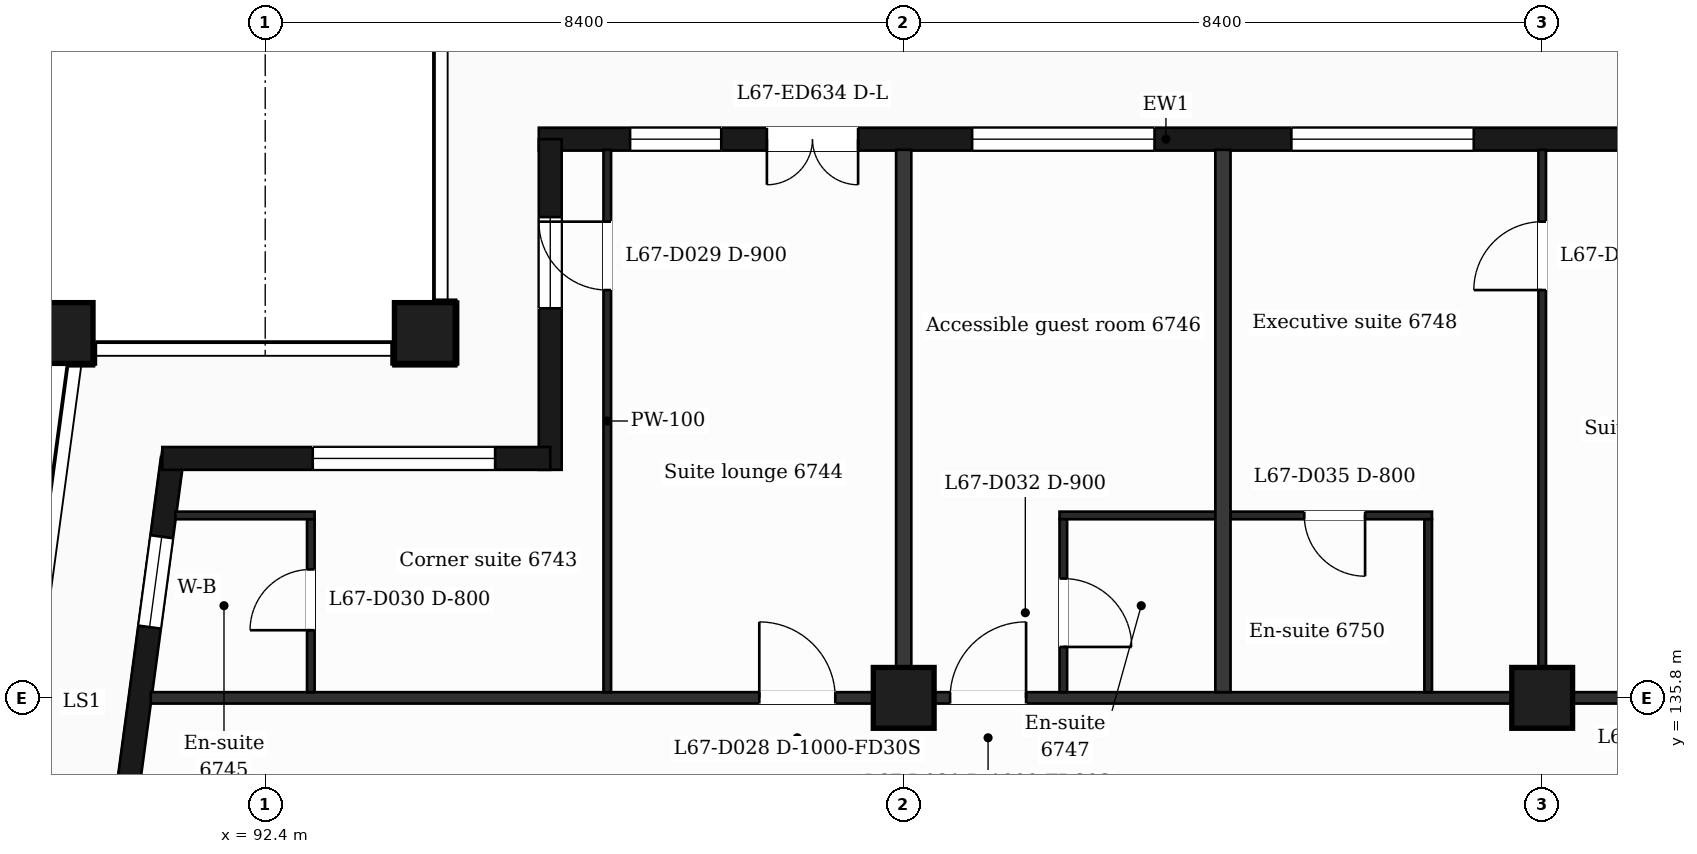
"""IFC4 building model, lengths in metres.
Left out: names, types, materials, properties, quantities, classifications, styles, units other than length and angle.
Written with IfcOpenShell. Run it as: python <this file> out.ifc"""

import sys

from ifc_helpers import new_model, si_unit, direction, frame, frame_2d, origin, origin_2d, place, context, subcontext, project, spatial, rectangle, extrude, element, fill, save


model = new_model("IFC4")
c1 = context("Model", 3, precision=1e-05, world=origin(), true_north=direction((0.0, 1.0)))
c2 = subcontext(c1, "Body", "Model", "MODEL_VIEW")
j1 = project(units=[si_unit("LENGTHUNIT", "METRE"), si_unit("PLANEANGLEUNIT", "RADIAN")], contexts=[c1])
p1 = place(None, origin())
s1 = spatial("IfcSite", under=j1, at=p1, CompositionType="ELEMENT")
p2 = place(p1, origin())
s2 = spatial("IfcBuilding", under=s1, at=p2, CompositionType="ELEMENT")
p3 = place(p2, frame((0.0, 0.0, 277.5)))
s3 = spatial("IfcBuildingStorey", under=s2, at=p3, CompositionType="ELEMENT", Elevation=277.5)
for number, where, z_axis, x_axis in (
    (1, (94.5, 140.6, 0.0), (0.0, 0.0, 1.0), (1.0, 0.0, 0.0)),
    (2, (89.735, 140.6, 0.0), (0.0, 0.0, 1.0), (1.0, 0.0, 0.0)),
    (3, (100.8, 135.8, 0.0), (0.0, 0.0, 1.0), (1.0, 0.0, 0.0)),
    (4, (109.2, 135.8, 0.0), (0.0, 0.0, 1.0), (1.0, 0.0, 0.0)),
):
    element("IfcColumn", number, at=place(p3, frame(where, z_axis=z_axis, x_axis=x_axis)), inside=s3, PredefinedType="COLUMN", context=c2, shape_type="SweptSolid", body=[
        extrude(rectangle(XDim=0.8, YDim=0.8, at=origin_2d()), origin(), (0.0, 0.0, 1.0), 3.7),
    ])
p4 = place(p3, frame((91.177, 138.95, 0.0), z_axis=(0.0, 0.0, 1.0), x_axis=(-0.133426664613, -0.991058689065, 0.0)))
e5 = element("IfcWall", 5, at=p4, inside=s3, PredefinedType="SOLIDWALL", context=c2, shape_type="SweptSolid", body=[
    extrude(rectangle(XDim=6.609, YDim=0.3, at=frame_2d((3.305, 0.0))), origin(), (0.0, 0.0, 1.0), 3.38),
])
p5 = place(p4, frame((1.039, 0.0, 0.9)))
e6 = element("IfcOpeningElement", 6, at=p5, cuts=e5, PredefinedType="OPENING", context=c2, shape_type="SweptSolid", body=[
    extrude(rectangle(XDim=1.2, YDim=2.1, at=frame_2d((0.6, 1.05))), frame((0.0, 0.16, 0.0), z_axis=(0.0, -1.0, 0.0), x_axis=(1.0, 0.0, 0.0)), (0.0, 0.0, 1.0), 0.32),
])
p6 = place(p4, frame((4.294, 0.0, 0.0)))
e7 = element("IfcOpeningElement", 7, at=p6, cuts=e5, PredefinedType="OPENING", context=c2, shape_type="SweptSolid", body=[
    extrude(rectangle(XDim=1.2, YDim=2.4, at=frame_2d((0.6, 1.2))), frame((0.0, 0.16, 0.0), z_axis=(0.0, -1.0, 0.0), x_axis=(1.0, 0.0, 0.0)), (0.0, 0.0, 1.0), 0.32),
])
p7 = place(p3, frame((112.5, 143.15, 0.0), z_axis=(0.0, 0.0, 1.0), x_axis=(-1.0, 0.0, 0.0)))
e8 = element("IfcWall", 8, at=p7, inside=s3, PredefinedType="SOLIDWALL", context=c2, shape_type="SweptSolid", body=[
    extrude(rectangle(XDim=16.5, YDim=0.3, at=frame_2d((8.25, 0.0))), origin(), (0.0, 0.0, 1.0), 3.38),
])
p8 = place(p7, frame((1.1, 0.0, 0.9)))
e9 = element("IfcOpeningElement", 9, at=p8, cuts=e8, PredefinedType="OPENING", context=c2, shape_type="SweptSolid", body=[
    extrude(rectangle(XDim=1.2, YDim=2.1, at=frame_2d((0.6, 1.05))), frame((0.0, 0.16, 0.0), z_axis=(0.0, -1.0, 0.0), x_axis=(1.0, 0.0, 0.0)), (0.0, 0.0, 1.0), 0.32),
])
p9 = place(p7, frame((4.2, 0.0, 0.9)))
e10 = element("IfcOpeningElement", 10, at=p9, cuts=e8, PredefinedType="OPENING", context=c2, shape_type="SweptSolid", body=[
    extrude(rectangle(XDim=2.4, YDim=2.1, at=frame_2d((1.2, 1.05))), frame((0.0, 0.16, 0.0), z_axis=(0.0, -1.0, 0.0), x_axis=(1.0, 0.0, 0.0)), (0.0, 0.0, 1.0), 0.32),
])
p10 = place(p7, frame((8.4, 0.0, 0.9)))
e11 = element("IfcOpeningElement", 11, at=p10, cuts=e8, PredefinedType="OPENING", context=c2, shape_type="SweptSolid", body=[
    extrude(rectangle(XDim=2.4, YDim=2.1, at=frame_2d((1.2, 1.05))), frame((0.0, 0.16, 0.0), z_axis=(0.0, -1.0, 0.0), x_axis=(1.0, 0.0, 0.0)), (0.0, 0.0, 1.0), 0.32),
])
p11 = place(p7, frame((12.3, 0.0, 0.0)))
e12 = element("IfcOpeningElement", 12, at=p11, cuts=e8, PredefinedType="OPENING", context=c2, shape_type="SweptSolid", body=[
    extrude(rectangle(XDim=1.2, YDim=2.4, at=frame_2d((0.6, 1.2))), frame((0.0, 0.16, 0.0), z_axis=(0.0, -1.0, 0.0), x_axis=(1.0, 0.0, 0.0)), (0.0, 0.0, 1.0), 0.32),
])
p12 = place(p7, frame((14.1, 0.0, 0.9)))
e13 = element("IfcOpeningElement", 13, at=p12, cuts=e8, PredefinedType="OPENING", context=c2, shape_type="SweptSolid", body=[
    extrude(rectangle(XDim=1.2, YDim=2.1, at=frame_2d((0.6, 1.05))), frame((0.0, 0.16, 0.0), z_axis=(0.0, -1.0, 0.0), x_axis=(1.0, 0.0, 0.0)), (0.0, 0.0, 1.0), 0.32),
])
p13 = place(p3, frame((96.15, 143.15, 0.0), z_axis=(0.0, 0.0, 1.0), x_axis=(0.0, -1.0, 0.0)))
e14 = element("IfcWall", 14, at=p13, inside=s3, PredefinedType="SOLIDWALL", context=c2, shape_type="SweptSolid", body=[
    extrude(rectangle(XDim=4.35, YDim=0.3, at=frame_2d((2.175, 0.0))), origin(), (0.0, 0.0, 1.0), 3.38),
])
p14 = place(p13, frame((1.025, 0.0, 0.9)))
e15 = element("IfcOpeningElement", 15, at=p14, cuts=e14, PredefinedType="OPENING", context=c2, shape_type="SweptSolid", body=[
    extrude(rectangle(XDim=1.2, YDim=2.1, at=frame_2d((0.6, 1.05))), frame((0.0, 0.16, 0.0), z_axis=(0.0, -1.0, 0.0), x_axis=(1.0, 0.0, 0.0)), (0.0, 0.0, 1.0), 0.32),
])
p15 = place(p3, frame((96.15, 138.95, 0.0), z_axis=(0.0, 0.0, 1.0), x_axis=(-1.0, 0.0, 0.0)))
e16 = element("IfcWall", 16, at=p15, inside=s3, PredefinedType="SOLIDWALL", context=c2, shape_type="SweptSolid", body=[
    extrude(rectangle(XDim=5.104, YDim=0.3, at=frame_2d((2.552, 0.0))), origin(), (0.0, 0.0, 1.0), 3.38),
])
p16 = place(p15, frame((0.725, 0.0, 0.9)))
e17 = element("IfcOpeningElement", 17, at=p16, cuts=e16, PredefinedType="OPENING", context=c2, shape_type="SweptSolid", body=[
    extrude(rectangle(XDim=2.4, YDim=2.1, at=frame_2d((1.2, 1.05))), frame((0.0, 0.16, 0.0), z_axis=(0.0, -1.0, 0.0), x_axis=(1.0, 0.0, 0.0)), (0.0, 0.0, 1.0), 0.32),
])
p17 = place(p3, frame((90.895, 135.8, 0.0), z_axis=(0.0, 0.0, 1.0), x_axis=(1.0, 0.0, 0.0)))
e18 = element("IfcWall", 18, at=p17, inside=s3, PredefinedType="PARTITIONING", context=c2, shape_type="SweptSolid", body=[
    extrude(rectangle(XDim=45.011, YDim=0.15, at=frame_2d((22.505, 0.0))), origin(), (0.0, 0.0, 1.0), 3.38),
])
p18 = place(p17, frame((8.005, 0.0, 0.0)))
e19 = element("IfcOpeningElement", 19, at=p18, cuts=e18, PredefinedType="OPENING", context=c2, shape_type="SweptSolid", body=[
    extrude(rectangle(XDim=1.0, YDim=2.1, at=frame_2d((0.5, 1.05))), frame((0.0, 0.085, 0.0), z_axis=(0.0, -1.0, 0.0), x_axis=(1.0, 0.0, 0.0)), (0.0, 0.0, 1.0), 0.17),
])
p19 = place(p17, frame((10.515, 0.0, 0.0)))
e20 = element("IfcOpeningElement", 20, at=p19, cuts=e18, PredefinedType="OPENING", context=c2, shape_type="SweptSolid", body=[
    extrude(rectangle(XDim=1.0, YDim=2.1, at=frame_2d((0.5, 1.05))), frame((0.0, 0.085, 0.0), z_axis=(0.0, -1.0, 0.0), x_axis=(1.0, 0.0, 0.0)), (0.0, 0.0, 1.0), 0.17),
])
p20 = place(p17, frame((20.156, 0.0, 0.0)))
e21 = element("IfcOpeningElement", 21, at=p20, cuts=e18, PredefinedType="OPENING", context=c2, shape_type="SweptSolid", body=[
    extrude(rectangle(XDim=1.0, YDim=2.1, at=frame_2d((0.5, 1.05))), frame((0.0, 0.085, 0.0), z_axis=(0.0, -1.0, 0.0), x_axis=(1.0, 0.0, 0.0)), (0.0, 0.0, 1.0), 0.17),
])
p21 = place(p17, frame((24.13, 0.0, 0.0)))
e22 = element("IfcOpeningElement", 22, at=p21, cuts=e18, PredefinedType="OPENING", context=c2, shape_type="SweptSolid", body=[
    extrude(rectangle(XDim=0.95, YDim=2.1, at=frame_2d((0.475, 1.05))), frame((0.0, 0.085, 0.0), z_axis=(0.0, -1.0, 0.0), x_axis=(1.0, 0.0, 0.0)), (0.0, 0.0, 1.0), 0.17),
])
p22 = place(p17, frame((29.492, 0.0, 0.0)))
e23 = element("IfcOpeningElement", 23, at=p22, cuts=e18, PredefinedType="OPENING", context=c2, shape_type="SweptSolid", body=[
    extrude(rectangle(XDim=0.95, YDim=2.1, at=frame_2d((0.475, 1.05))), frame((0.0, 0.085, 0.0), z_axis=(0.0, -1.0, 0.0), x_axis=(1.0, 0.0, 0.0)), (0.0, 0.0, 1.0), 0.17),
])
p23 = place(p17, frame((31.705, 0.0, 0.0)))
e24 = element("IfcOpeningElement", 24, at=p23, cuts=e18, PredefinedType="OPENING", context=c2, shape_type="SweptSolid", body=[
    extrude(rectangle(XDim=0.95, YDim=2.1, at=frame_2d((0.475, 1.05))), frame((0.0, 0.085, 0.0), z_axis=(0.0, -1.0, 0.0), x_axis=(1.0, 0.0, 0.0)), (0.0, 0.0, 1.0), 0.17),
])
p24 = place(p17, frame((39.814, 0.0, 0.0)))
e25 = element("IfcOpeningElement", 25, at=p24, cuts=e18, PredefinedType="OPENING", context=c2, shape_type="SweptSolid", body=[
    extrude(rectangle(XDim=0.95, YDim=2.1, at=frame_2d((0.475, 1.05))), frame((0.0, 0.085, 0.0), z_axis=(0.0, -1.0, 0.0), x_axis=(1.0, 0.0, 0.0)), (0.0, 0.0, 1.0), 0.17),
])
p25 = place(p3, frame((91.218, 138.2, 0.0), z_axis=(0.0, 0.0, 1.0), x_axis=(1.0, 0.0, 0.0)))
e26 = element("IfcWall", 26, at=p25, inside=s3, PredefinedType="PARTITIONING", context=c2, shape_type="SweptSolid", body=[
    extrude(rectangle(XDim=1.832, YDim=0.1, at=frame_2d((0.916, 0.0))), origin(), (0.0, 0.0, 1.0), 3.38),
])
p26 = place(p3, frame((102.85, 138.2, 0.0), z_axis=(0.0, 0.0, 1.0), x_axis=(1.0, 0.0, 0.0)))
e27 = element("IfcWall", 27, at=p26, inside=s3, PredefinedType="PARTITIONING", context=c2, shape_type="SweptSolid", body=[
    extrude(rectangle(XDim=4.9, YDim=0.1, at=frame_2d((2.45, 0.0))), origin(), (0.0, 0.0, 1.0), 3.38),
])
p27 = place(p26, frame((3.22, 0.0, 0.0)))
e28 = element("IfcOpeningElement", 28, at=p27, cuts=e27, PredefinedType="OPENING", context=c2, shape_type="SweptSolid", body=[
    extrude(rectangle(XDim=0.8, YDim=2.1, at=frame_2d((0.4, 1.05))), frame((0.0, 0.06, 0.0), z_axis=(0.0, -1.0, 0.0), x_axis=(1.0, 0.0, 0.0)), (0.0, 0.0, 1.0), 0.12),
])
p28 = place(p3, frame((93.0, 135.875, 0.0), z_axis=(0.0, 0.0, 1.0), x_axis=(0.0, 1.0, 0.0)))
e29 = element("IfcWall", 29, at=p28, inside=s3, PredefinedType="PARTITIONING", context=c2, shape_type="SweptSolid", body=[
    extrude(rectangle(XDim=2.275, YDim=0.1, at=frame_2d((1.137, 0.0))), origin(), (0.0, 0.0, 1.0), 3.38),
])
p29 = place(p28, frame((0.815, 0.0, 0.0)))
e30 = element("IfcOpeningElement", 30, at=p29, cuts=e29, PredefinedType="OPENING", context=c2, shape_type="SweptSolid", body=[
    extrude(rectangle(XDim=0.8, YDim=2.1, at=frame_2d((0.4, 1.05))), frame((0.0, 0.06, 0.0), z_axis=(0.0, -1.0, 0.0), x_axis=(1.0, 0.0, 0.0)), (0.0, 0.0, 1.0), 0.12),
])
p30 = place(p3, frame((96.9, 135.875, 0.0), z_axis=(0.0, 0.0, 1.0), x_axis=(0.0, 1.0, 0.0)))
e31 = element("IfcWall", 31, at=p30, inside=s3, PredefinedType="PARTITIONING", context=c2, shape_type="SweptSolid", body=[
    extrude(rectangle(XDim=7.135, YDim=0.1, at=frame_2d((3.567, 0.0))), origin(), (0.0, 0.0, 1.0), 3.38),
])
p31 = place(p30, frame((5.29, 0.0, 0.0)))
e32 = element("IfcOpeningElement", 32, at=p31, cuts=e31, PredefinedType="OPENING", context=c2, shape_type="SweptSolid", body=[
    extrude(rectangle(XDim=0.9, YDim=2.1, at=frame_2d((0.45, 1.05))), frame((0.0, 0.06, 0.0), z_axis=(0.0, -1.0, 0.0), x_axis=(1.0, 0.0, 0.0)), (0.0, 0.0, 1.0), 0.12),
])
p32 = place(p3, frame((100.8, 135.875, 0.0), z_axis=(0.0, 0.0, 1.0), x_axis=(0.0, 1.0, 0.0)))
e33 = element("IfcWall", 33, at=p32, inside=s3, PredefinedType="PARTITIONING", context=c2, shape_type="SweptSolid", body=[
    extrude(rectangle(XDim=7.135, YDim=0.2, at=frame_2d((3.567, 0.0))), origin(), (0.0, 0.0, 1.0), 3.38),
])
p33 = place(p3, frame((102.9, 135.875, 0.0), z_axis=(0.0, 0.0, 1.0), x_axis=(0.0, 1.0, 0.0)))
e34 = element("IfcWall", 34, at=p33, inside=s3, PredefinedType="PARTITIONING", context=c2, shape_type="SweptSolid", body=[
    extrude(rectangle(XDim=2.275, YDim=0.1, at=frame_2d((1.137, 0.0))), origin(), (0.0, 0.0, 1.0), 3.38),
])
p34 = place(p33, frame((0.595, 0.0, 0.0)))
e35 = element("IfcOpeningElement", 35, at=p34, cuts=e34, PredefinedType="OPENING", context=c2, shape_type="SweptSolid", body=[
    extrude(rectangle(XDim=0.9, YDim=2.1, at=frame_2d((0.45, 1.05))), frame((0.0, 0.06, 0.0), z_axis=(0.0, -1.0, 0.0), x_axis=(1.0, 0.0, 0.0)), (0.0, 0.0, 1.0), 0.12),
])
p35 = place(p3, frame((105.0, 135.875, 0.0), z_axis=(0.0, 0.0, 1.0), x_axis=(0.0, 1.0, 0.0)))
e36 = element("IfcWall", 36, at=p35, inside=s3, PredefinedType="PARTITIONING", context=c2, shape_type="SweptSolid", body=[
    extrude(rectangle(XDim=7.135, YDim=0.2, at=frame_2d((3.567, 0.0))), origin(), (0.0, 0.0, 1.0), 3.38),
])
p36 = place(p3, frame((107.7, 135.875, 0.0), z_axis=(0.0, 0.0, 1.0), x_axis=(0.0, 1.0, 0.0)))
e37 = element("IfcWall", 37, at=p36, inside=s3, PredefinedType="PARTITIONING", context=c2, shape_type="SweptSolid", body=[
    extrude(rectangle(XDim=2.275, YDim=0.1, at=frame_2d((1.137, 0.0))), origin(), (0.0, 0.0, 1.0), 3.38),
])
p37 = place(p3, frame((109.2, 135.875, 0.0), z_axis=(0.0, 0.0, 1.0), x_axis=(0.0, 1.0, 0.0)))
e38 = element("IfcWall", 38, at=p37, inside=s3, PredefinedType="PARTITIONING", context=c2, shape_type="SweptSolid", body=[
    extrude(rectangle(XDim=7.135, YDim=0.1, at=frame_2d((3.567, 0.0))), origin(), (0.0, 0.0, 1.0), 3.38),
])
p38 = place(p37, frame((5.29, 0.0, 0.0)))
e39 = element("IfcOpeningElement", 39, at=p38, cuts=e38, PredefinedType="OPENING", context=c2, shape_type="SweptSolid", body=[
    extrude(rectangle(XDim=0.9, YDim=2.1, at=frame_2d((0.45, 1.05))), frame((0.0, 0.06, 0.0), z_axis=(0.0, -1.0, 0.0), x_axis=(1.0, 0.0, 0.0)), (0.0, 0.0, 1.0), 0.12),
])
p39 = place(p5, origin())
e40 = element("IfcWindow", 40, at=p39, inside=s3, PartitioningType="SINGLE_PANEL", PredefinedType="WINDOW", context=c2, shape_type="SweptSolid", body=[
    extrude(rectangle(XDim=1.2, YDim=2.1, at=frame_2d((0.6, 1.05))), frame((0.0, 0.03, 0.0), z_axis=(0.0, -1.0, 0.0), x_axis=(1.0, 0.0, 0.0)), (0.0, 0.0, 1.0), 0.06),
])
fill(e6, e40)
p40 = place(p8, origin())
e41 = element("IfcWindow", 41, at=p40, inside=s3, PartitioningType="SINGLE_PANEL", PredefinedType="WINDOW", context=c2, shape_type="SweptSolid", body=[
    extrude(rectangle(XDim=1.2, YDim=2.1, at=frame_2d((0.6, 1.05))), frame((0.0, 0.03, 0.0), z_axis=(0.0, -1.0, 0.0), x_axis=(1.0, 0.0, 0.0)), (0.0, 0.0, 1.0), 0.06),
])
fill(e9, e41)
p41 = place(p9, origin())
e42 = element("IfcWindow", 42, at=p41, inside=s3, PartitioningType="SINGLE_PANEL", PredefinedType="WINDOW", context=c2, shape_type="SweptSolid", body=[
    extrude(rectangle(XDim=2.4, YDim=2.1, at=frame_2d((1.2, 1.05))), frame((0.0, 0.03, 0.0), z_axis=(0.0, -1.0, 0.0), x_axis=(1.0, 0.0, 0.0)), (0.0, 0.0, 1.0), 0.06),
])
fill(e10, e42)
p42 = place(p10, origin())
e43 = element("IfcWindow", 43, at=p42, inside=s3, PartitioningType="SINGLE_PANEL", PredefinedType="WINDOW", context=c2, shape_type="SweptSolid", body=[
    extrude(rectangle(XDim=2.4, YDim=2.1, at=frame_2d((1.2, 1.05))), frame((0.0, 0.03, 0.0), z_axis=(0.0, -1.0, 0.0), x_axis=(1.0, 0.0, 0.0)), (0.0, 0.0, 1.0), 0.06),
])
fill(e11, e43)
p43 = place(p11, origin())
e44 = element("IfcDoor", 44, at=p43, inside=s3, OperationType="DOUBLE_DOOR_SINGLE_SWING", PredefinedType="DOOR", context=c2, shape_type="SweptSolid", body=[
    extrude(rectangle(XDim=1.2, YDim=2.4, at=frame_2d((0.6, 1.2))), frame((0.0, 0.025, 0.0), z_axis=(0.0, -1.0, 0.0), x_axis=(1.0, 0.0, 0.0)), (0.0, 0.0, 1.0), 0.05),
])
fill(e12, e44)
p44 = place(p12, origin())
e45 = element("IfcWindow", 45, at=p44, inside=s3, PartitioningType="SINGLE_PANEL", PredefinedType="WINDOW", context=c2, shape_type="SweptSolid", body=[
    extrude(rectangle(XDim=1.2, YDim=2.1, at=frame_2d((0.6, 1.05))), frame((0.0, 0.03, 0.0), z_axis=(0.0, -1.0, 0.0), x_axis=(1.0, 0.0, 0.0)), (0.0, 0.0, 1.0), 0.06),
])
fill(e13, e45)
p45 = place(p14, origin())
e46 = element("IfcWindow", 46, at=p45, inside=s3, PartitioningType="SINGLE_PANEL", PredefinedType="WINDOW", context=c2, shape_type="SweptSolid", body=[
    extrude(rectangle(XDim=1.2, YDim=2.1, at=frame_2d((0.6, 1.05))), frame((0.0, 0.03, 0.0), z_axis=(0.0, -1.0, 0.0), x_axis=(1.0, 0.0, 0.0)), (0.0, 0.0, 1.0), 0.06),
])
fill(e15, e46)
p46 = place(p16, origin())
e47 = element("IfcWindow", 47, at=p46, inside=s3, PartitioningType="SINGLE_PANEL", PredefinedType="WINDOW", context=c2, shape_type="SweptSolid", body=[
    extrude(rectangle(XDim=2.4, YDim=2.1, at=frame_2d((1.2, 1.05))), frame((0.0, 0.03, 0.0), z_axis=(0.0, -1.0, 0.0), x_axis=(1.0, 0.0, 0.0)), (0.0, 0.0, 1.0), 0.06),
])
fill(e17, e47)
p47 = place(p18, origin())
e48 = element("IfcDoor", 48, at=p47, inside=s3, OperationType="SINGLE_SWING_LEFT", PredefinedType="DOOR", context=c2, shape_type="SweptSolid", body=[
    extrude(rectangle(XDim=1.0, YDim=2.1, at=frame_2d((0.5, 1.05))), frame((0.0, 0.025, 0.0), z_axis=(0.0, -1.0, 0.0), x_axis=(1.0, 0.0, 0.0)), (0.0, 0.0, 1.0), 0.05),
])
fill(e19, e48)
p48 = place(p31, origin())
e49 = element("IfcDoor", 49, at=p48, inside=s3, OperationType="SINGLE_SWING_RIGHT", PredefinedType="DOOR", context=c2, shape_type="SweptSolid", body=[
    extrude(rectangle(XDim=0.9, YDim=2.1, at=frame_2d((0.45, 1.05))), frame((0.0, 0.025, 0.0), z_axis=(0.0, -1.0, 0.0), x_axis=(1.0, 0.0, 0.0)), (0.0, 0.0, 1.0), 0.05),
])
fill(e32, e49)
p49 = place(p29, origin())
e50 = element("IfcDoor", 50, at=p49, inside=s3, OperationType="SINGLE_SWING_LEFT", PredefinedType="DOOR", context=c2, shape_type="SweptSolid", body=[
    extrude(rectangle(XDim=0.8, YDim=2.1, at=frame_2d((0.4, 1.05))), frame((0.0, 0.025, 0.0), z_axis=(0.0, -1.0, 0.0), x_axis=(1.0, 0.0, 0.0)), (0.0, 0.0, 1.0), 0.05),
])
fill(e30, e50)
p50 = place(p19, origin())
e51 = element("IfcDoor", 51, at=p50, inside=s3, OperationType="SINGLE_SWING_RIGHT", PredefinedType="DOOR", context=c2, shape_type="SweptSolid", body=[
    extrude(rectangle(XDim=1.0, YDim=2.1, at=frame_2d((0.5, 1.05))), frame((0.0, 0.025, 0.0), z_axis=(0.0, -1.0, 0.0), x_axis=(1.0, 0.0, 0.0)), (0.0, 0.0, 1.0), 0.05),
])
fill(e20, e51)
p51 = place(p34, origin())
e52 = element("IfcDoor", 52, at=p51, inside=s3, OperationType="SINGLE_SWING_LEFT", PredefinedType="DOOR", context=c2, shape_type="SweptSolid", body=[
    extrude(rectangle(XDim=0.9, YDim=2.1, at=frame_2d((0.45, 1.05))), frame((0.0, 0.025, 0.0), z_axis=(0.0, -1.0, 0.0), x_axis=(1.0, 0.0, 0.0)), (0.0, 0.0, 1.0), 0.05),
])
fill(e35, e52)
p52 = place(p38, origin())
e53 = element("IfcDoor", 53, at=p52, inside=s3, OperationType="SINGLE_SWING_LEFT", PredefinedType="DOOR", context=c2, shape_type="SweptSolid", body=[
    extrude(rectangle(XDim=0.9, YDim=2.1, at=frame_2d((0.45, 1.05))), frame((0.0, 0.025, 0.0), z_axis=(0.0, -1.0, 0.0), x_axis=(1.0, 0.0, 0.0)), (0.0, 0.0, 1.0), 0.05),
])
fill(e39, e53)
p53 = place(p27, origin())
e54 = element("IfcDoor", 54, at=p53, inside=s3, OperationType="SINGLE_SWING_RIGHT", PredefinedType="DOOR", context=c2, shape_type="SweptSolid", body=[
    extrude(rectangle(XDim=0.8, YDim=2.1, at=frame_2d((0.4, 1.05))), frame((0.0, 0.025, 0.0), z_axis=(0.0, -1.0, 0.0), x_axis=(1.0, 0.0, 0.0)), (0.0, 0.0, 1.0), 0.05),
])
fill(e28, e54)
save(model, sys.argv[1])
